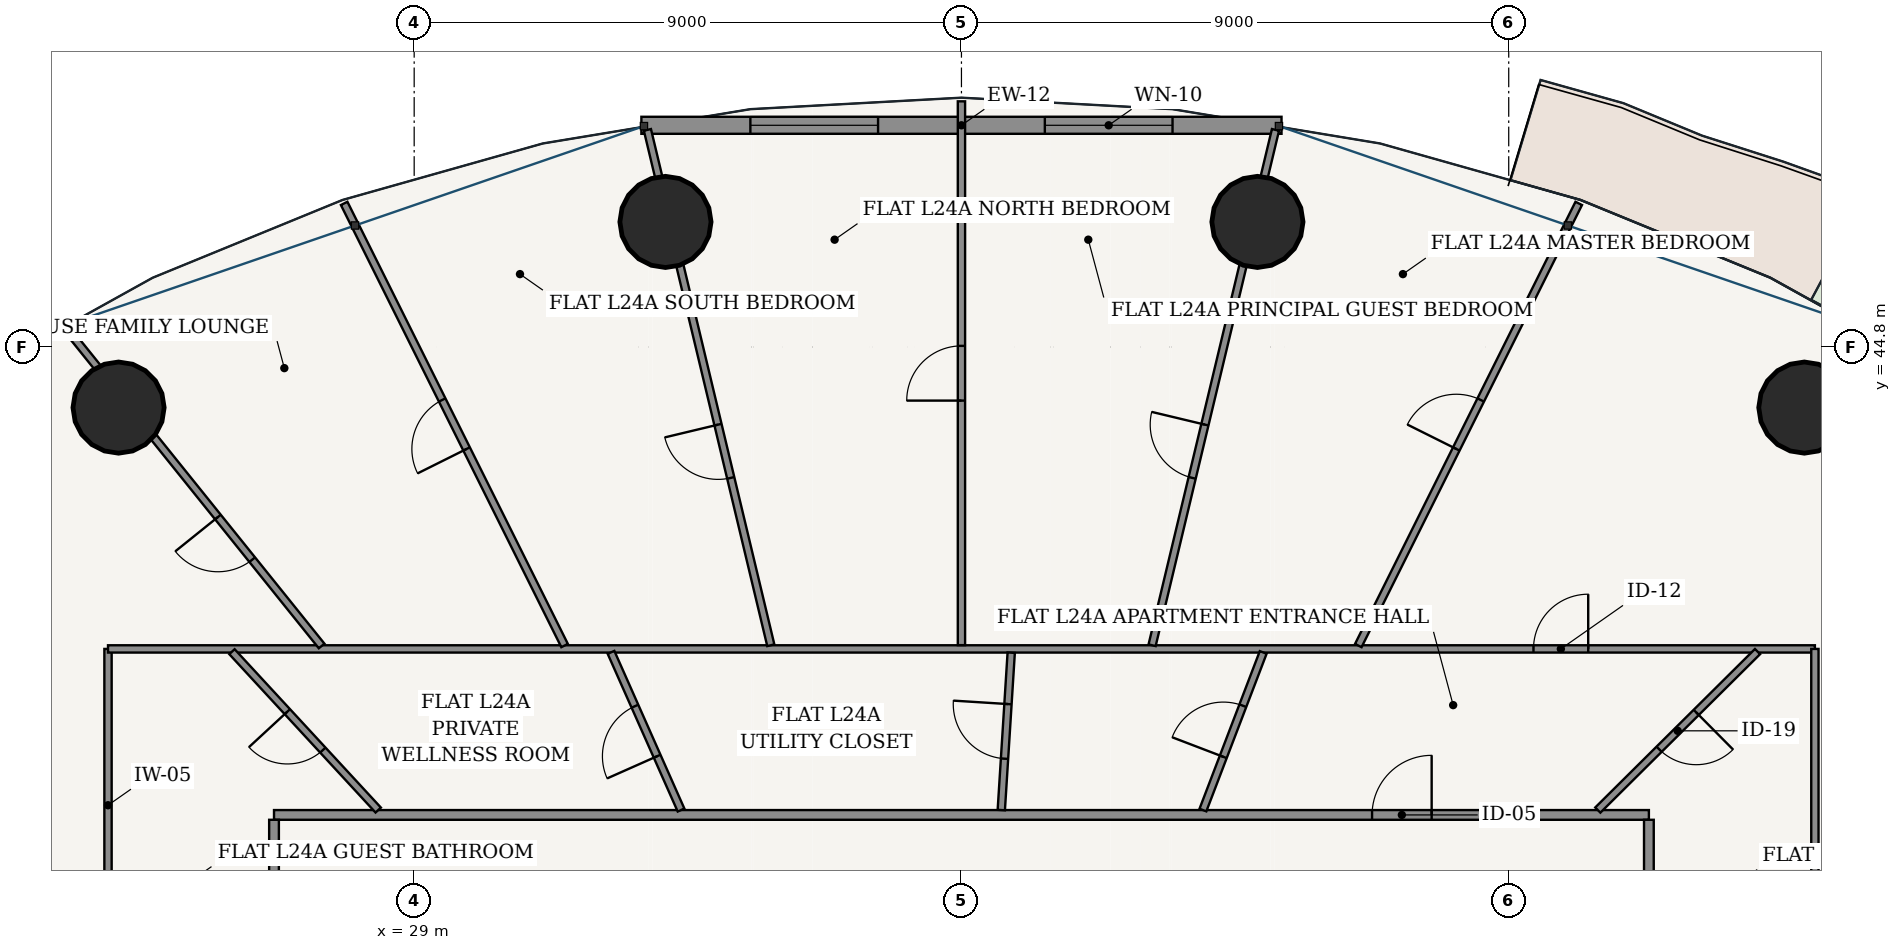
"""IFC4 building model, lengths in metres.
Left out: names, types, materials, properties, quantities, classifications, styles, units other than length and angle.
Written with IfcOpenShell. Run it as: python <this file> out.ifc"""

import sys

from ifc_helpers import new_model, si_unit, direction, frame, frame_2d, origin, origin_2d, place, context, subcontext, project, spatial, rectangle, hollow_circle, extrude, source, transform, mapped, element, fill, save


model = new_model("IFC4")
c1 = context("Model", 3, precision=1e-05, world=origin(), true_north=direction((-0.2419218956, 0.970295726276)))
c2 = subcontext(c1, "Body", "Model", "MODEL_VIEW")
j1 = project(units=[si_unit("LENGTHUNIT", "METRE"), si_unit("PLANEANGLEUNIT", "RADIAN")], contexts=[c1])
p1 = place(None, origin())
s1 = spatial("IfcSite", under=j1, at=p1, CompositionType="ELEMENT")
p2 = place(p1, origin())
s2 = spatial("IfcBuilding", under=s1, at=p2, CompositionType="ELEMENT")
p3 = place(p2, frame((0.0, 0.0, 94.2)))
s3 = spatial("IfcBuildingStorey", under=s2, at=p3, CompositionType="ELEMENT", Elevation=94.2)
for number, where, z_axis, x_axis in (
    (1, (51.862, 43.803, 0.0), (0.0, 0.0, 1.0), (1.0, 0.0, 0.0)),
    (2, (42.867, 46.857, 0.0), (0.0, 0.0, 1.0), (1.0, 0.0, 0.0)),
    (3, (33.133, 46.857, 0.0), (0.0, 0.0, 1.0), (1.0, 0.0, 0.0)),
    (4, (24.138, 43.803, 0.0), (0.0, 0.0, 1.0), (1.0, 0.0, 0.0)),
):
    element("IfcColumn", number, at=place(p3, frame(where, z_axis=z_axis, x_axis=x_axis)), inside=s3, PredefinedType="COLUMN", context=c2, shape_type="SweptSolid", body=[
        extrude(hollow_circle(Radius=0.75, WallThickness=0.045, at=origin_2d()), origin(), (0.0, 0.0, 1.0), 3.6),
    ])
p4 = place(p3, frame((43.264, 48.446, 0.0), z_axis=(0.0, 0.0, 1.0), x_axis=(-1.0, 0.0, 0.0)))
e5 = element("IfcWall", 5, at=p4, inside=s3, PredefinedType="SOLIDWALL", context=c2, shape_type="SweptSolid", body=[
    extrude(rectangle(XDim=10.527, YDim=0.28, at=frame_2d((5.264, 0.0))), origin(), (0.0, 0.0, 1.0), 3.325),
])
p5 = place(p4, frame((1.792, 0.0, 0.85)))
e6 = element("IfcOpeningElement", 6, at=p5, cuts=e5, PredefinedType="OPENING", context=c2, shape_type="SweptSolid", body=[
    extrude(rectangle(XDim=2.1, YDim=1.95, at=frame_2d((1.05, 0.975))), frame((0.0, 0.15, 0.0), z_axis=(0.0, -1.0, 0.0), x_axis=(1.0, 0.0, 0.0)), (0.0, 0.0, 1.0), 0.3),
])
p6 = place(p4, frame((6.635, 0.0, 0.85)))
e7 = element("IfcOpeningElement", 7, at=p6, cuts=e5, PredefinedType="OPENING", context=c2, shape_type="SweptSolid", body=[
    extrude(rectangle(XDim=2.1, YDim=1.95, at=frame_2d((1.05, 0.975))), frame((0.0, 0.15, 0.0), z_axis=(0.0, -1.0, 0.0), x_axis=(1.0, 0.0, 0.0)), (0.0, 0.0, 1.0), 0.3),
])
p7 = place(p3, frame((26.695, 37.105, 0.0), z_axis=(0.0, 0.0, 1.0), x_axis=(1.0, 0.0, 0.0)))
e8 = element("IfcWall", 8, at=p7, inside=s3, PredefinedType="PARTITIONING", context=c2, shape_type="SweptSolid", body=[
    extrude(rectangle(XDim=22.61, YDim=0.16, at=frame_2d((11.305, 0.0))), origin(), (0.0, 0.0, 1.0), 2.767),
])
p8 = place(p7, frame((18.058, 0.0, 0.0)))
e9 = element("IfcOpeningElement", 9, at=p8, cuts=e8, PredefinedType="OPENING", context=c2, shape_type="SweptSolid", body=[
    extrude(rectangle(XDim=0.98, YDim=2.2, at=frame_2d((0.49, 1.1))), frame((0.0, 0.09, 0.0), z_axis=(0.0, -1.0, 0.0), x_axis=(1.0, 0.0, 0.0)), (0.0, 0.0, 1.0), 0.18),
])
for number, where, z_axis, x_axis in (
    (10, (26.695, 16.575, 0.0), (0.0, 0.0, 1.0), (0.0, 1.0, 0.0)),
    (11, (49.305, 16.575, 0.0), (0.0, 0.0, 1.0), (0.0, 1.0, 0.0)),
):
    element("IfcWall", number, at=place(p3, frame(where, z_axis=z_axis, x_axis=x_axis)), inside=s3, PredefinedType="PARTITIONING", context=c2, shape_type="SweptSolid", body=[
        extrude(rectangle(XDim=20.45, YDim=0.16, at=frame_2d((10.225, 0.0))), origin(), (0.0, 0.0, 1.0), 2.767),
    ])
p9 = place(p3, frame((49.387, 33.121, 0.0), z_axis=(0.0, 0.0, 1.0), x_axis=(0.874320165728, 0.485349613992, 0.0)))
e12 = element("IfcWall", 12, at=p9, inside=s3, PredefinedType="PARTITIONING", context=c2, shape_type="SweptSolid", body=[
    extrude(rectangle(XDim=12.156, YDim=0.2, at=frame_2d((6.078, 0.0))), origin(), (0.0, 0.0, 1.0), 2.767),
])
p10 = place(p3, frame((23.965, 34.693, 0.0), z_axis=(0.0, 0.0, 1.0), x_axis=(0.0, 1.0, 0.0)))
e13 = element("IfcWall", 13, at=p10, inside=s3, PredefinedType="PARTITIONING", context=c2, shape_type="SweptSolid", body=[
    extrude(rectangle(XDim=5.142, YDim=0.12, at=frame_2d((2.571, 0.0))), origin(), (0.0, 0.0, 1.0), 3.004),
])
p11 = place(p3, frame((23.965, 39.835, 0.0), z_axis=(0.0, 0.0, 1.0), x_axis=(1.0, 0.0, 0.0)))
e14 = element("IfcWall", 14, at=p11, inside=s3, PredefinedType="PARTITIONING", context=c2, shape_type="SweptSolid", body=[
    extrude(rectangle(XDim=28.07, YDim=0.12, at=frame_2d((14.035, 0.0))), origin(), (0.0, 0.0, 1.0), 2.767),
])
p12 = place(p11, frame((23.442, 0.0, 0.0)))
e15 = element("IfcOpeningElement", 15, at=p12, cuts=e14, PredefinedType="OPENING", context=c2, shape_type="SweptSolid", body=[
    extrude(rectangle(XDim=0.9, YDim=2.15, at=frame_2d((0.45, 1.075))), frame((0.0, 0.07, 0.0), z_axis=(0.0, -1.0, 0.0), x_axis=(1.0, 0.0, 0.0)), (0.0, 0.0, 1.0), 0.14),
])
p13 = place(p3, frame((52.035, 39.835, 0.0), z_axis=(0.0, 0.0, 1.0), x_axis=(0.0, -1.0, 0.0)))
e16 = element("IfcWall", 16, at=p13, inside=s3, PredefinedType="PARTITIONING", context=c2, shape_type="SweptSolid", body=[
    extrude(rectangle(XDim=5.142, YDim=0.12, at=frame_2d((2.571, 0.0))), origin(), (0.0, 0.0, 1.0), 3.004),
])
p14 = place(p3, frame((44.526, 39.89, 0.0), z_axis=(0.0, 0.0, 1.0), x_axis=(0.446167584581, 0.894949432353, 0.0)))
e17 = element("IfcWall", 17, at=p14, inside=s3, PredefinedType="PARTITIONING", context=c2, shape_type="SweptSolid", body=[
    extrude(rectangle(XDim=8.125, YDim=0.12, at=frame_2d((4.062, 0.0))), origin(), (0.0, 0.0, 1.0), 2.767),
])
p15 = place(p14, frame((3.612, 0.0, 0.0)))
e18 = element("IfcOpeningElement", 18, at=p15, cuts=e17, PredefinedType="OPENING", context=c2, shape_type="SweptSolid", body=[
    extrude(rectangle(XDim=0.9, YDim=2.15, at=frame_2d((0.45, 1.075))), frame((0.0, 0.07, 0.0), z_axis=(0.0, -1.0, 0.0), x_axis=(1.0, 0.0, 0.0)), (0.0, 0.0, 1.0), 0.14),
])
p16 = place(p3, frame((41.135, 39.895, 0.0), z_axis=(0.0, 0.0, 1.0), x_axis=(0.23282725047, 0.97251810854, 0.0)))
e19 = element("IfcWall", 19, at=p16, inside=s3, PredefinedType="PARTITIONING", context=c2, shape_type="SweptSolid", body=[
    extrude(rectangle(XDim=8.715, YDim=0.12, at=frame_2d((4.357, 0.0))), origin(), (0.0, 0.0, 1.0), 2.767),
])
p17 = place(p16, frame((2.831, 0.0, 0.0)))
e20 = element("IfcOpeningElement", 20, at=p17, cuts=e19, PredefinedType="OPENING", context=c2, shape_type="SweptSolid", body=[
    extrude(rectangle(XDim=0.9, YDim=2.15, at=frame_2d((0.45, 1.075))), frame((0.0, 0.07, 0.0), z_axis=(0.0, -1.0, 0.0), x_axis=(1.0, 0.0, 0.0)), (0.0, 0.0, 1.0), 0.14),
])
p18 = place(p3, frame((38.0, 39.897, 0.0), z_axis=(0.0, 0.0, 1.0), x_axis=(0.0, 1.0, 0.0)))
e21 = element("IfcWall", 21, at=p18, inside=s3, PredefinedType="PARTITIONING", context=c2, shape_type="SweptSolid", body=[
    extrude(rectangle(XDim=8.943, YDim=0.12, at=frame_2d((4.472, 0.0))), origin(), (0.0, 0.0, 1.0), 2.767),
])
p19 = place(p18, frame((4.021, 0.0, 0.0)))
e22 = element("IfcOpeningElement", 22, at=p19, cuts=e21, PredefinedType="OPENING", context=c2, shape_type="SweptSolid", body=[
    extrude(rectangle(XDim=0.9, YDim=2.15, at=frame_2d((0.45, 1.075))), frame((0.0, 0.07, 0.0), z_axis=(0.0, -1.0, 0.0), x_axis=(1.0, 0.0, 0.0)), (0.0, 0.0, 1.0), 0.14),
])
p20 = place(p3, frame((34.865, 39.895, 0.0), z_axis=(0.0, 0.0, 1.0), x_axis=(-0.23282725047, 0.97251810854, 0.0)))
e23 = element("IfcWall", 23, at=p20, inside=s3, PredefinedType="PARTITIONING", context=c2, shape_type="SweptSolid", body=[
    extrude(rectangle(XDim=8.715, YDim=0.12, at=frame_2d((4.357, 0.0))), origin(), (0.0, 0.0, 1.0), 2.767),
])
p21 = place(p20, frame((2.83, 0.0, 0.0)))
e24 = element("IfcOpeningElement", 24, at=p21, cuts=e23, PredefinedType="OPENING", context=c2, shape_type="SweptSolid", body=[
    extrude(rectangle(XDim=0.9, YDim=2.15, at=frame_2d((0.45, 1.075))), frame((0.0, 0.07, 0.0), z_axis=(0.0, -1.0, 0.0), x_axis=(1.0, 0.0, 0.0)), (0.0, 0.0, 1.0), 0.14),
])
p22 = place(p3, frame((31.474, 39.89, 0.0), z_axis=(0.0, 0.0, 1.0), x_axis=(-0.446167584581, 0.894949432353, 0.0)))
e25 = element("IfcWall", 25, at=p22, inside=s3, PredefinedType="PARTITIONING", context=c2, shape_type="SweptSolid", body=[
    extrude(rectangle(XDim=8.125, YDim=0.12, at=frame_2d((4.062, 0.0))), origin(), (0.0, 0.0, 1.0), 2.767),
])
p23 = place(p22, frame((3.612, 0.0, 0.0)))
e26 = element("IfcOpeningElement", 26, at=p23, cuts=e25, PredefinedType="OPENING", context=c2, shape_type="SweptSolid", body=[
    extrude(rectangle(XDim=0.9, YDim=2.15, at=frame_2d((0.45, 1.075))), frame((0.0, 0.07, 0.0), z_axis=(0.0, -1.0, 0.0), x_axis=(1.0, 0.0, 0.0)), (0.0, 0.0, 1.0), 0.14),
])
p24 = place(p3, frame((27.478, 39.883, 0.0), z_axis=(0.0, 0.0, 1.0), x_axis=(-0.62672583251, 0.779239841682, 0.0)))
e27 = element("IfcWall", 27, at=p24, inside=s3, PredefinedType="PARTITIONING", context=c2, shape_type="SweptSolid", body=[
    extrude(rectangle(XDim=6.678, YDim=0.12, at=frame_2d((3.339, 0.0))), origin(), (0.0, 0.0, 1.0), 2.767),
])
p25 = place(p24, frame((1.821, 0.0, 0.0)))
e28 = element("IfcOpeningElement", 28, at=p25, cuts=e27, PredefinedType="OPENING", context=c2, shape_type="SweptSolid", body=[
    extrude(rectangle(XDim=0.9, YDim=2.15, at=frame_2d((0.45, 1.075))), frame((0.0, 0.07, 0.0), z_axis=(0.0, -1.0, 0.0), x_axis=(1.0, 0.0, 0.0)), (0.0, 0.0, 1.0), 0.14),
])
p26 = place(p3, frame((48.465, 37.185, 0.0), z_axis=(0.0, 0.0, 1.0), x_axis=(0.709839752998, 0.704363205359, 0.0)))
e29 = element("IfcWall", 29, at=p26, inside=s3, PredefinedType="PARTITIONING", context=c2, shape_type="SweptSolid", body=[
    extrude(rectangle(XDim=3.7, YDim=0.12, at=frame_2d((1.85, 0.0))), origin(), (0.0, 0.0, 1.0), 2.767),
])
p27 = place(p26, frame((1.42, 0.0, 0.0)))
e30 = element("IfcOpeningElement", 30, at=p27, cuts=e29, PredefinedType="OPENING", context=c2, shape_type="SweptSolid", body=[
    extrude(rectangle(XDim=0.86, YDim=2.15, at=frame_2d((0.43, 1.075))), frame((0.0, 0.07, 0.0), z_axis=(0.0, -1.0, 0.0), x_axis=(1.0, 0.0, 0.0)), (0.0, 0.0, 1.0), 0.14),
])
p28 = place(p3, frame((41.971, 37.185, 0.0), z_axis=(0.0, 0.0, 1.0), x_axis=(0.357180358075, 0.934035433913, 0.0)))
e31 = element("IfcWall", 31, at=p28, inside=s3, PredefinedType="PARTITIONING", context=c2, shape_type="SweptSolid", body=[
    extrude(rectangle(XDim=2.775, YDim=0.12, at=frame_2d((1.388, 0.0))), origin(), (0.0, 0.0, 1.0), 3.325),
])
p29 = place(p28, frame((0.938, 0.0, 0.0)))
e32 = element("IfcOpeningElement", 32, at=p29, cuts=e31, PredefinedType="OPENING", context=c2, shape_type="SweptSolid", body=[
    extrude(rectangle(XDim=0.9, YDim=2.15, at=frame_2d((0.45, 1.075))), frame((0.0, 0.07, 0.0), z_axis=(0.0, -1.0, 0.0), x_axis=(1.0, 0.0, 0.0)), (0.0, 0.0, 1.0), 0.14),
])
p30 = place(p3, frame((38.655, 37.185, 0.0), z_axis=(0.0, 0.0, 1.0), x_axis=(0.062981965009, 0.998014665265, 0.0)))
e33 = element("IfcWall", 33, at=p30, inside=s3, PredefinedType="PARTITIONING", context=c2, shape_type="SweptSolid", body=[
    extrude(rectangle(XDim=2.593, YDim=0.12, at=frame_2d((1.297, 0.0))), origin(), (0.0, 0.0, 1.0), 3.325),
])
p31 = place(p30, frame((0.847, 0.0, 0.0)))
e34 = element("IfcOpeningElement", 34, at=p31, cuts=e33, PredefinedType="OPENING", context=c2, shape_type="SweptSolid", body=[
    extrude(rectangle(XDim=0.9, YDim=2.15, at=frame_2d((0.45, 1.075))), frame((0.0, 0.07, 0.0), z_axis=(0.0, -1.0, 0.0), x_axis=(1.0, 0.0, 0.0)), (0.0, 0.0, 1.0), 0.14),
])
p32 = place(p3, frame((33.389, 37.185, 0.0), z_axis=(0.0, 0.0, 1.0), x_axis=(-0.40585903307, 0.913935689902, 0.0)))
e35 = element("IfcWall", 35, at=p32, inside=s3, PredefinedType="PARTITIONING", context=c2, shape_type="SweptSolid", body=[
    extrude(rectangle(XDim=2.837, YDim=0.12, at=frame_2d((1.419, 0.0))), origin(), (0.0, 0.0, 1.0), 3.325),
])
p33 = place(p32, frame((0.969, 0.0, 0.0)))
e36 = element("IfcOpeningElement", 36, at=p33, cuts=e35, PredefinedType="OPENING", context=c2, shape_type="SweptSolid", body=[
    extrude(rectangle(XDim=0.9, YDim=2.15, at=frame_2d((0.45, 1.075))), frame((0.0, 0.07, 0.0), z_axis=(0.0, -1.0, 0.0), x_axis=(1.0, 0.0, 0.0)), (0.0, 0.0, 1.0), 0.14),
])
p34 = place(p3, frame((28.409, 37.185, 0.0), z_axis=(0.0, 0.0, 1.0), x_axis=(-0.678451695105, 0.734645014554, 0.0)))
e37 = element("IfcWall", 37, at=p34, inside=s3, PredefinedType="PARTITIONING", context=c2, shape_type="SweptSolid", body=[
    extrude(rectangle(XDim=3.545, YDim=0.12, at=frame_2d((1.772, 0.0))), origin(), (0.0, 0.0, 1.0), 2.767),
])
p35 = place(p34, frame((1.343, 0.0, 0.0)))
e38 = element("IfcOpeningElement", 38, at=p35, cuts=e37, PredefinedType="OPENING", context=c2, shape_type="SweptSolid", body=[
    extrude(rectangle(XDim=0.86, YDim=2.15, at=frame_2d((0.43, 1.075))), frame((0.0, 0.07, 0.0), z_axis=(0.0, -1.0, 0.0), x_axis=(1.0, 0.0, 0.0)), (0.0, 0.0, 1.0), 0.14),
])
p36 = place(p3, frame((26.615, 33.12, 0.0), z_axis=(0.0, 0.0, 1.0), x_axis=(-0.874319192772, 0.485351366692, 0.0)))
e39 = element("IfcWall", 39, at=p36, inside=s3, PredefinedType="PARTITIONING", context=c2, shape_type="SweptSolid", body=[
    extrude(rectangle(XDim=12.158, YDim=0.2, at=frame_2d((6.079, 0.0))), origin(), (0.0, 0.0, 1.0), 2.767),
])
m1 = source(origin(), c2, "Body", "SweptSolid", [
    extrude(rectangle(XDim=2.1, YDim=1.95, at=frame_2d((1.05, 0.975))), frame((0.0, 0.03, 0.0), z_axis=(0.0, -1.0, 0.0), x_axis=(1.0, 0.0, 0.0)), (0.0, 0.0, 1.0), 0.06),
])
p37 = place(p5, origin())
e40 = element("IfcWindow", 40, at=p37, inside=s3, PartitioningType="SINGLE_PANEL", PredefinedType="WINDOW", context=c2, shape_type="MappedRepresentation", body=[
    mapped(m1, transform((0.0, 0.0, 0.0), scale=1.0)),
])
fill(e6, e40)
p38 = place(p6, origin())
e41 = element("IfcWindow", 41, at=p38, inside=s3, PartitioningType="SINGLE_PANEL", PredefinedType="WINDOW", context=c2, shape_type="MappedRepresentation", body=[
    mapped(m1, transform((0.0, 0.0, 0.0), scale=1.0)),
])
fill(e7, e41)
m2 = source(origin(), c2, "Body", "SweptSolid", [
    extrude(rectangle(XDim=0.98, YDim=2.2, at=frame_2d((0.49, 1.1))), frame((0.0, 0.025, 0.0), z_axis=(0.0, -1.0, 0.0), x_axis=(1.0, 0.0, 0.0)), (0.0, 0.0, 1.0), 0.05),
])
p39 = place(p8, origin())
e42 = element("IfcDoor", 42, at=p39, inside=s3, OperationType="SINGLE_SWING_RIGHT", PredefinedType="DOOR", context=c2, shape_type="MappedRepresentation", body=[
    mapped(m2, transform((0.0, 0.0, 0.0), scale=1.0)),
])
fill(e9, e42)
m3 = source(origin(), c2, "Body", "SweptSolid", [
    extrude(rectangle(XDim=0.86, YDim=2.15, at=frame_2d((0.43, 1.075))), frame((0.0, 0.025, 0.0), z_axis=(0.0, -1.0, 0.0), x_axis=(1.0, 0.0, 0.0)), (0.0, 0.0, 1.0), 0.05),
])
p40 = place(p27, frame((0.86, 0.0, 0.0), z_axis=(0.0, 0.0, 1.0), x_axis=(-1.0, 0.0, 0.0)))
e43 = element("IfcDoor", 43, at=p40, inside=s3, OperationType="SINGLE_SWING_LEFT", PredefinedType="DOOR", context=c2, shape_type="MappedRepresentation", body=[
    mapped(m3, transform((0.0, 0.0, 0.0), scale=1.0)),
])
fill(e30, e43)
m4 = source(origin(), c2, "Body", "SweptSolid", [
    extrude(rectangle(XDim=0.9, YDim=2.15, at=frame_2d((0.45, 1.075))), frame((0.0, 0.025, 0.0), z_axis=(0.0, -1.0, 0.0), x_axis=(1.0, 0.0, 0.0)), (0.0, 0.0, 1.0), 0.05),
])
p41 = place(p12, origin())
e44 = element("IfcDoor", 44, at=p41, inside=s3, OperationType="SINGLE_SWING_RIGHT", PredefinedType="DOOR", context=c2, shape_type="MappedRepresentation", body=[
    mapped(m4, transform((0.0, 0.0, 0.0), scale=1.0)),
])
fill(e15, e44)
p42 = place(p29, origin())
e45 = element("IfcDoor", 45, at=p42, inside=s3, OperationType="SINGLE_SWING_LEFT", PredefinedType="DOOR", context=c2, shape_type="MappedRepresentation", body=[
    mapped(m4, transform((0.0, 0.0, 0.0), scale=1.0)),
])
fill(e32, e45)
p43 = place(p31, origin())
e46 = element("IfcDoor", 46, at=p43, inside=s3, OperationType="SINGLE_SWING_RIGHT", PredefinedType="DOOR", context=c2, shape_type="MappedRepresentation", body=[
    mapped(m4, transform((0.0, 0.0, 0.0), scale=1.0)),
])
fill(e34, e46)
p44 = place(p33, origin())
e47 = element("IfcDoor", 47, at=p44, inside=s3, OperationType="SINGLE_SWING_LEFT", PredefinedType="DOOR", context=c2, shape_type="MappedRepresentation", body=[
    mapped(m4, transform((0.0, 0.0, 0.0), scale=1.0)),
])
fill(e36, e47)
p45 = place(p35, origin())
e48 = element("IfcDoor", 48, at=p45, inside=s3, OperationType="SINGLE_SWING_RIGHT", PredefinedType="DOOR", context=c2, shape_type="MappedRepresentation", body=[
    mapped(m3, transform((0.0, 0.0, 0.0), scale=1.0)),
])
fill(e38, e48)
p46 = place(p15, origin())
e49 = element("IfcDoor", 49, at=p46, inside=s3, OperationType="SINGLE_SWING_LEFT", PredefinedType="DOOR", context=c2, shape_type="MappedRepresentation", body=[
    mapped(m4, transform((0.0, 0.0, 0.0), scale=1.0)),
])
fill(e18, e49)
p47 = place(p17, origin())
e50 = element("IfcDoor", 50, at=p47, inside=s3, OperationType="SINGLE_SWING_RIGHT", PredefinedType="DOOR", context=c2, shape_type="MappedRepresentation", body=[
    mapped(m4, transform((0.0, 0.0, 0.0), scale=1.0)),
])
fill(e20, e50)
p48 = place(p19, origin())
e51 = element("IfcDoor", 51, at=p48, inside=s3, OperationType="SINGLE_SWING_LEFT", PredefinedType="DOOR", context=c2, shape_type="MappedRepresentation", body=[
    mapped(m4, transform((0.0, 0.0, 0.0), scale=1.0)),
])
fill(e22, e51)
p49 = place(p21, origin())
e52 = element("IfcDoor", 52, at=p49, inside=s3, OperationType="SINGLE_SWING_RIGHT", PredefinedType="DOOR", context=c2, shape_type="MappedRepresentation", body=[
    mapped(m4, transform((0.0, 0.0, 0.0), scale=1.0)),
])
fill(e24, e52)
p50 = place(p23, origin())
e53 = element("IfcDoor", 53, at=p50, inside=s3, OperationType="SINGLE_SWING_LEFT", PredefinedType="DOOR", context=c2, shape_type="MappedRepresentation", body=[
    mapped(m4, transform((0.0, 0.0, 0.0), scale=1.0)),
])
fill(e26, e53)
p51 = place(p25, origin())
e54 = element("IfcDoor", 54, at=p51, inside=s3, OperationType="SINGLE_SWING_RIGHT", PredefinedType="DOOR", context=c2, shape_type="MappedRepresentation", body=[
    mapped(m4, transform((0.0, 0.0, 0.0), scale=1.0)),
])
fill(e28, e54)
save(model, sys.argv[1])
